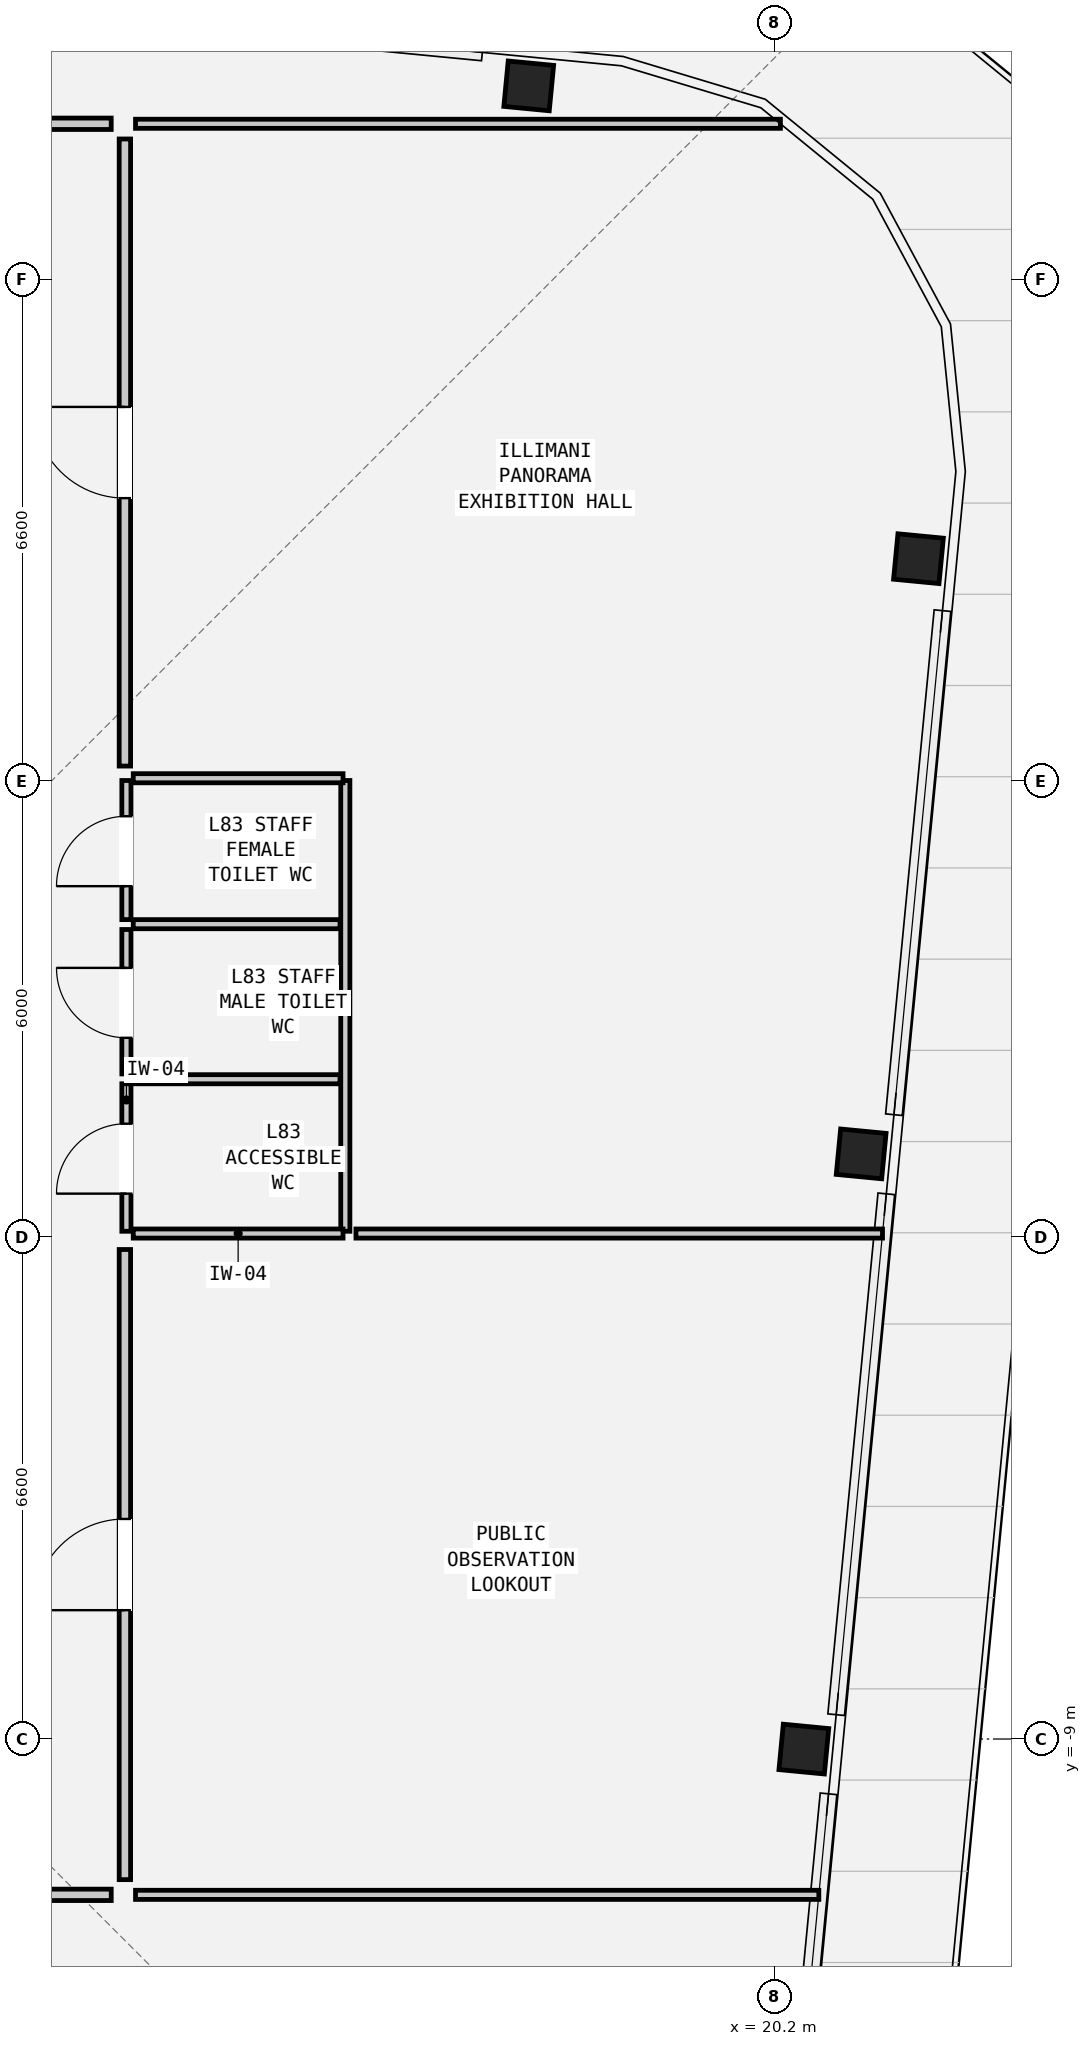
"""IFC4 building model, lengths in metres.
Left out: names, types, materials, properties, quantities, classifications, styles, units other than length and angle.
Written with IfcOpenShell. Run it as: python <this file> out.ifc"""

import sys

from ifc_helpers import new_model, si_unit, direction, frame, frame_2d, origin, origin_2d, place, context, subcontext, project, spatial, rectangle, hollow_rectangle, extrude, element, fill, save


model = new_model("IFC4")
c1 = context("Model", 3, precision=1e-05, world=origin(), true_north=direction((0.0, 1.0)))
c2 = subcontext(c1, "Body", "Model", "MODEL_VIEW")
j1 = project(units=[si_unit("LENGTHUNIT", "METRE"), si_unit("PLANEANGLEUNIT", "RADIAN")], contexts=[c1])
p1 = place(None, origin())
s1 = spatial("IfcSite", under=j1, at=p1, CompositionType="ELEMENT")
p2 = place(p1, origin())
s2 = spatial("IfcBuilding", under=s1, at=p2, CompositionType="ELEMENT")
p3 = place(p2, frame((0.0, 0.0, 280.55)))
s3 = spatial("IfcBuildingStorey", under=s2, at=p3, CompositionType="ELEMENT", Elevation=280.55)
for number, where, z_axis, x_axis in (
    (1, (20.583, -9.133, 0.0), (0.0, 0.0, 1.0), (0.096, 0.995, 0.0)),
    (2, (21.336, -1.302, 0.0), (0.0, 0.0, 1.0), (0.096, 0.995, 0.0)),
    (3, (22.09, 6.528, 0.0), (0.0, 0.0, 1.0), (0.096, 0.995, 0.0)),
    (4, (16.963, 12.749, 0.0), (0.0, 0.0, 1.0), (0.995, -0.096, 0.0)),
):
    element("IfcColumn", number, at=place(p3, frame(where, z_axis=z_axis, x_axis=x_axis)), inside=s3, PredefinedType="COLUMN", context=c2, shape_type="SweptSolid", body=[
        extrude(hollow_rectangle(XDim=0.6, YDim=0.6, WallThickness=0.04, at=origin_2d()), origin(), (0.0, 0.0, 1.0), 4.35),
    ])
p4 = place(p3, frame((11.67, -2.32, 0.0), z_axis=(0.0, 0.0, 1.0), x_axis=(0.0, 1.0, 0.0)))
e5 = element("IfcWall", 5, at=p4, inside=s3, PredefinedType="PARTITIONING", context=c2, shape_type="SweptSolid", body=[
    extrude(rectangle(XDim=1.94, YDim=0.12, at=frame_2d((0.97, 0.0))), origin(), (0.0, 0.0, 1.0), 4.07),
])
p5 = place(p4, frame((0.495, 0.0, 0.0)))
e6 = element("IfcOpeningElement", 6, at=p5, cuts=e5, PredefinedType="OPENING", context=c2, shape_type="SweptSolid", body=[
    extrude(rectangle(XDim=0.92, YDim=2.1, at=frame_2d((0.46, 1.05))), frame((0.0, 0.072, 0.0), z_axis=(0.0, -1.0, 0.0), x_axis=(1.0, 0.0, 0.0)), (0.0, 0.0, 1.0), 0.144),
])
p6 = place(p3, frame((11.67, -0.25, 0.0), z_axis=(0.0, 0.0, 1.0), x_axis=(0.0, 1.0, 0.0)))
e7 = element("IfcWall", 7, at=p6, inside=s3, PredefinedType="PARTITIONING", context=c2, shape_type="SweptSolid", body=[
    extrude(rectangle(XDim=1.9, YDim=0.12, at=frame_2d((0.95, 0.0))), origin(), (0.0, 0.0, 1.0), 4.07),
])
p7 = place(p6, frame((0.475, 0.0, 0.0)))
e8 = element("IfcOpeningElement", 8, at=p7, cuts=e7, PredefinedType="OPENING", context=c2, shape_type="SweptSolid", body=[
    extrude(rectangle(XDim=0.92, YDim=2.1, at=frame_2d((0.46, 1.05))), frame((0.0, 0.072, 0.0), z_axis=(0.0, -1.0, 0.0), x_axis=(1.0, 0.0, 0.0)), (0.0, 0.0, 1.0), 0.144),
])
p8 = place(p3, frame((11.67, 1.78, 0.0), z_axis=(0.0, 0.0, 1.0), x_axis=(0.0, 1.0, 0.0)))
e9 = element("IfcWall", 9, at=p8, inside=s3, PredefinedType="PARTITIONING", context=c2, shape_type="SweptSolid", body=[
    extrude(rectangle(XDim=1.83, YDim=0.12, at=frame_2d((0.915, 0.0))), origin(), (0.0, 0.0, 1.0), 4.07),
])
p9 = place(p8, frame((0.44, 0.0, 0.0)))
e10 = element("IfcOpeningElement", 10, at=p9, cuts=e9, PredefinedType="OPENING", context=c2, shape_type="SweptSolid", body=[
    extrude(rectangle(XDim=0.92, YDim=2.1, at=frame_2d((0.46, 1.05))), frame((0.0, 0.072, 0.0), z_axis=(0.0, -1.0, 0.0), x_axis=(1.0, 0.0, 0.0)), (0.0, 0.0, 1.0), 0.144),
])
p10 = place(p3, frame((14.55, -2.32, 0.0), z_axis=(0.0, 0.0, 1.0), x_axis=(0.0, 1.0, 0.0)))
e11 = element("IfcWall", 11, at=p10, inside=s3, PredefinedType="PARTITIONING", context=c2, shape_type="SweptSolid", body=[
    extrude(rectangle(XDim=5.93, YDim=0.12, at=frame_2d((2.965, 0.0))), origin(), (0.0, 0.0, 1.0), 4.07),
])
for number, where, z_axis, x_axis in (
    (12, (11.76, -2.35, 0.0), (0.0, 0.0, 1.0), (1.0, 0.0, 0.0)),
    (13, (11.76, 3.64, 0.0), (0.0, 0.0, 1.0), (1.0, 0.0, 0.0)),
):
    element("IfcWall", number, at=place(p3, frame(where, z_axis=z_axis, x_axis=x_axis)), inside=s3, PredefinedType="PARTITIONING", context=c2, shape_type="SweptSolid", body=[
        extrude(rectangle(XDim=2.76, YDim=0.12, at=frame_2d((1.38, 0.0))), origin(), (0.0, 0.0, 1.0), 2.25),
    ])
for number, where, z_axis, x_axis in (
    (14, (11.76, -0.32, 0.0), (0.0, 0.0, 1.0), (1.0, 0.0, 0.0)),
    (15, (11.76, 1.72, 0.0), (0.0, 0.0, 1.0), (1.0, 0.0, 0.0)),
):
    element("IfcWall", number, at=place(p3, frame(where, z_axis=z_axis, x_axis=x_axis)), inside=s3, PredefinedType="PARTITIONING", context=c2, shape_type="SweptSolid", body=[
        extrude(rectangle(XDim=2.72, YDim=0.12, at=frame_2d((1.36, 0.0))), origin(), (0.0, 0.0, 1.0), 4.07),
    ])
p11 = place(p3, frame((11.79, 12.25, 0.0), z_axis=(0.0, 0.0, 1.0), x_axis=(1.0, 0.0, 0.0)))
e16 = element("IfcWall", 16, at=p11, inside=s3, PredefinedType="PARTITIONING", context=c2, shape_type="SweptSolid", body=[
    extrude(rectangle(XDim=8.484, YDim=0.12, at=frame_2d((4.242, 0.0))), origin(), (0.0, 0.0, 1.0), 2.25),
])
p12 = place(p3, frame((11.79, -11.05, 0.0), z_axis=(0.0, 0.0, 1.0), x_axis=(1.0, 0.0, 0.0)))
e17 = element("IfcWall", 17, at=p12, inside=s3, PredefinedType="PARTITIONING", context=c2, shape_type="SweptSolid", body=[
    extrude(rectangle(XDim=8.99, YDim=0.12, at=frame_2d((4.495, 0.0))), origin(), (0.0, 0.0, 1.0), 4.07),
])
p13 = place(p3, frame((14.69, -2.35, 0.0), z_axis=(0.0, 0.0, 1.0), x_axis=(1.0, 0.0, 0.0)))
e18 = element("IfcWall", 18, at=p13, inside=s3, PredefinedType="PARTITIONING", context=c2, shape_type="SweptSolid", body=[
    extrude(rectangle(XDim=6.927, YDim=0.12, at=frame_2d((3.464, 0.0))), origin(), (0.0, 0.0, 1.0), 2.25),
])
p14 = place(p3, frame((0.18, 12.25, 0.0), z_axis=(0.0, 0.0, 1.0), x_axis=(1.0, 0.0, 0.0)))
e19 = element("IfcWall", 19, at=p14, inside=s3, PredefinedType="PARTITIONING", context=c2, shape_type="SweptSolid", body=[
    extrude(rectangle(XDim=11.29, YDim=0.15, at=frame_2d((5.645, 0.0))), origin(), (0.0, 0.0, 1.0), 2.25),
])
p15 = place(p14, frame((5.045, 0.0, 0.0)))
e20 = element("IfcOpeningElement", 20, at=p15, cuts=e19, PredefinedType="OPENING", context=c2, shape_type="SweptSolid", body=[
    extrude(rectangle(XDim=1.2, YDim=2.1, at=frame_2d((0.6, 1.05))), frame((0.0, 0.087, 0.0), z_axis=(0.0, -1.0, 0.0), x_axis=(1.0, 0.0, 0.0)), (0.0, 0.0, 1.0), 0.174),
])
p16 = place(p3, frame((5.38, -11.05, 0.0), z_axis=(0.0, 0.0, 1.0), x_axis=(1.0, 0.0, 0.0)))
e21 = element("IfcWall", 21, at=p16, inside=s3, PredefinedType="PARTITIONING", context=c2, shape_type="SweptSolid", body=[
    extrude(rectangle(XDim=6.09, YDim=0.15, at=frame_2d((3.045, 0.0))), origin(), (0.0, 0.0, 1.0), 2.25),
])
p17 = place(p16, frame((2.57, 0.0, 0.0)))
e22 = element("IfcOpeningElement", 22, at=p17, cuts=e21, PredefinedType="OPENING", context=c2, shape_type="SweptSolid", body=[
    extrude(rectangle(XDim=0.95, YDim=2.1, at=frame_2d((0.475, 1.05))), frame((0.0, 0.087, 0.0), z_axis=(0.0, -1.0, 0.0), x_axis=(1.0, 0.0, 0.0)), (0.0, 0.0, 1.0), 0.174),
])
p18 = place(p3, frame((11.65, -10.85, 0.0), z_axis=(0.0, 0.0, 1.0), x_axis=(0.0, 1.0, 0.0)))
e23 = element("IfcWall", 23, at=p18, inside=s3, PredefinedType="PARTITIONING", context=c2, shape_type="SweptSolid", body=[
    extrude(rectangle(XDim=8.29, YDim=0.15, at=frame_2d((4.145, 0.0))), origin(), (0.0, 0.0, 1.0), 4.07),
])
p19 = place(p18, frame((3.545, 0.0, 0.0)))
e24 = element("IfcOpeningElement", 24, at=p19, cuts=e23, PredefinedType="OPENING", context=c2, shape_type="SweptSolid", body=[
    extrude(rectangle(XDim=1.2, YDim=2.1, at=frame_2d((0.6, 1.05))), frame((0.0, 0.087, 0.0), z_axis=(0.0, -1.0, 0.0), x_axis=(1.0, 0.0, 0.0)), (0.0, 0.0, 1.0), 0.174),
])
p20 = place(p3, frame((11.65, 3.8, 0.0), z_axis=(0.0, 0.0, 1.0), x_axis=(0.0, 1.0, 0.0)))
e25 = element("IfcWall", 25, at=p20, inside=s3, PredefinedType="PARTITIONING", context=c2, shape_type="SweptSolid", body=[
    extrude(rectangle(XDim=8.25, YDim=0.15, at=frame_2d((4.125, 0.0))), origin(), (0.0, 0.0, 1.0), 4.07),
])
p21 = place(p20, frame((3.525, 0.0, 0.0)))
e26 = element("IfcOpeningElement", 26, at=p21, cuts=e25, PredefinedType="OPENING", context=c2, shape_type="SweptSolid", body=[
    extrude(rectangle(XDim=1.2, YDim=2.1, at=frame_2d((0.6, 1.05))), frame((0.0, 0.087, 0.0), z_axis=(0.0, -1.0, 0.0), x_axis=(1.0, 0.0, 0.0)), (0.0, 0.0, 1.0), 0.174),
])
p22 = place(p5, origin())
e27 = element("IfcDoor", 27, at=p22, inside=s3, OperationType="SINGLE_SWING_LEFT", PredefinedType="DOOR", context=c2, shape_type="SweptSolid", body=[
    extrude(rectangle(XDim=0.92, YDim=2.1, at=frame_2d((0.46, 1.05))), frame((0.0, 0.025, 0.0), z_axis=(0.0, -1.0, 0.0), x_axis=(1.0, 0.0, 0.0)), (0.0, 0.0, 1.0), 0.05),
])
fill(e6, e27)
p23 = place(p7, origin())
e28 = element("IfcDoor", 28, at=p23, inside=s3, OperationType="SINGLE_SWING_RIGHT", PredefinedType="DOOR", context=c2, shape_type="SweptSolid", body=[
    extrude(rectangle(XDim=0.92, YDim=2.1, at=frame_2d((0.46, 1.05))), frame((0.0, 0.025, 0.0), z_axis=(0.0, -1.0, 0.0), x_axis=(1.0, 0.0, 0.0)), (0.0, 0.0, 1.0), 0.05),
])
fill(e8, e28)
p24 = place(p9, origin())
e29 = element("IfcDoor", 29, at=p24, inside=s3, OperationType="SINGLE_SWING_LEFT", PredefinedType="DOOR", context=c2, shape_type="SweptSolid", body=[
    extrude(rectangle(XDim=0.92, YDim=2.1, at=frame_2d((0.46, 1.05))), frame((0.0, 0.025, 0.0), z_axis=(0.0, -1.0, 0.0), x_axis=(1.0, 0.0, 0.0)), (0.0, 0.0, 1.0), 0.05),
])
fill(e10, e29)
p25 = place(p19, origin())
e30 = element("IfcDoor", 30, at=p25, inside=s3, OperationType="SINGLE_SWING_LEFT", PredefinedType="DOOR", context=c2, shape_type="SweptSolid", body=[
    extrude(rectangle(XDim=1.2, YDim=2.1, at=frame_2d((0.6, 1.05))), frame((0.0, 0.025, 0.0), z_axis=(0.0, -1.0, 0.0), x_axis=(1.0, 0.0, 0.0)), (0.0, 0.0, 1.0), 0.05),
])
fill(e24, e30)
p26 = place(p21, origin())
e31 = element("IfcDoor", 31, at=p26, inside=s3, OperationType="SINGLE_SWING_RIGHT", PredefinedType="DOOR", context=c2, shape_type="SweptSolid", body=[
    extrude(rectangle(XDim=1.2, YDim=2.1, at=frame_2d((0.6, 1.05))), frame((0.0, 0.025, 0.0), z_axis=(0.0, -1.0, 0.0), x_axis=(1.0, 0.0, 0.0)), (0.0, 0.0, 1.0), 0.05),
])
fill(e26, e31)
save(model, sys.argv[1])
